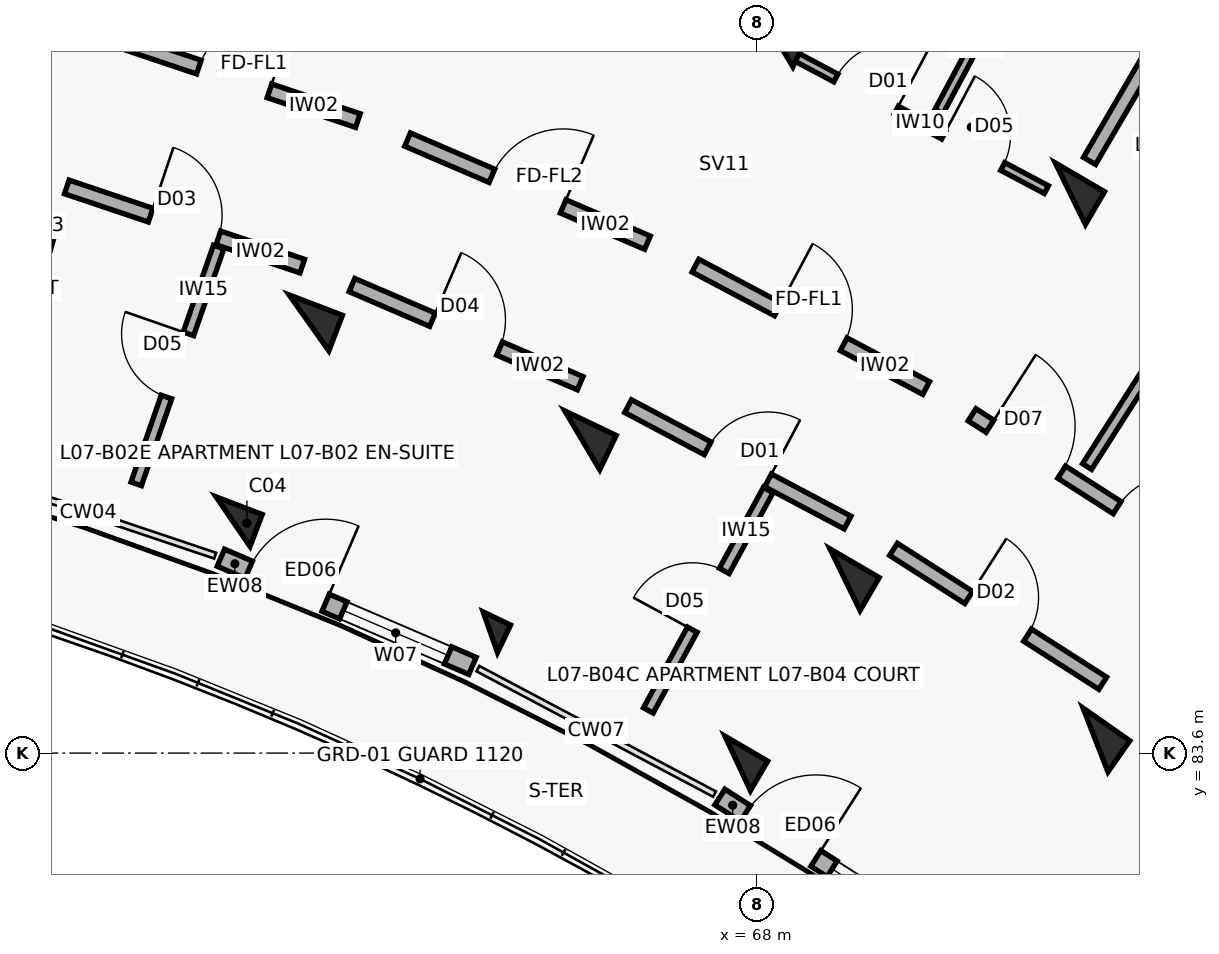
"""IFC4 building model, lengths in metres.
Left out: names, types, materials, properties, quantities, classifications, styles, units other than length and angle.
Written with IfcOpenShell. Run it as: python <this file> out.ifc"""

import sys

from ifc_helpers import new_model, si_unit, direction, frame, frame_2d, origin, origin_2d, place, context, subcontext, project, spatial, rectangle, extrude, element, fill, save


model = new_model("IFC4")
c1 = context("Model", 3, precision=1e-05, world=origin(), true_north=direction((0.0, 1.0)))
c2 = subcontext(c1, "Body", "Model", "MODEL_VIEW")
j1 = project(units=[si_unit("LENGTHUNIT", "METRE"), si_unit("PLANEANGLEUNIT", "RADIAN")], contexts=[c1])
p1 = place(None, origin())
s1 = spatial("IfcSite", under=j1, at=p1, CompositionType="ELEMENT")
p2 = place(p1, origin())
s2 = spatial("IfcBuilding", under=s1, at=p2, CompositionType="ELEMENT")
p3 = place(p2, frame((0.0, 0.0, 23.6)))
s3 = spatial("IfcBuildingStorey", under=s2, at=p3, CompositionType="ELEMENT", Elevation=23.6)
p4 = place(p3, frame((58.401, 90.508, 0.0), z_axis=(0.0, 0.0, 1.0), x_axis=(0.27966144946, 0.96009867914, 0.0)))
e1 = element("IfcColumn", 1, at=p4, inside=s3, PredefinedType="COLUMN", context=c2, shape_type="SweptSolid", body=[
    extrude(rectangle(XDim=0.5, YDim=0.75, at=origin_2d()), origin(), (0.0, 0.0, 1.0), 3.1),
])
p5 = place(p3, frame((61.111, 86.646, 0.0), z_axis=(0.0, 0.0, 1.0), x_axis=(0.357064076459, 0.934079892355, 0.0)))
e2 = element("IfcColumn", 2, at=p5, inside=s3, PredefinedType="COLUMN", context=c2, shape_type="SweptSolid", body=[
    extrude(rectangle(XDim=0.45, YDim=0.65, at=origin_2d()), origin(), (0.0, 0.0, 1.0), 3.1),
])
p6 = place(p3, frame((62.111, 89.261, 0.0), z_axis=(0.0, 0.0, 1.0), x_axis=(0.357064076459, 0.934079892355, 0.0)))
e3 = element("IfcColumn", 3, at=p6, inside=s3, PredefinedType="COLUMN", context=c2, shape_type="SweptSolid", body=[
    extrude(rectangle(XDim=0.5, YDim=0.75, at=origin_2d()), origin(), (0.0, 0.0, 1.0), 3.1),
])
p7 = place(p3, frame((64.496, 85.191, 0.0), z_axis=(0.0, 0.0, 1.0), x_axis=(0.432085748802, 0.901832526405, 0.0)))
e4 = element("IfcColumn", 4, at=p7, inside=s3, PredefinedType="COLUMN", context=c2, shape_type="SweptSolid", body=[
    extrude(rectangle(XDim=0.4, YDim=0.4, at=origin_2d()), origin(), (0.0, 0.0, 1.0), 3.1),
])
for number, where, z_axis, x_axis in (
    (5, (65.706, 87.716, 0.0), (0.0, 0.0, 1.0), (0.432, 0.902, 0.0)),
    (6, (68.246, 93.019, 0.0), (0.0, 0.0, 1.0), (0.432, 0.902, 0.0)),
):
    element("IfcColumn", number, at=place(p3, frame(where, z_axis=z_axis, x_axis=x_axis)), inside=s3, PredefinedType="COLUMN", context=c2, shape_type="SweptSolid", body=[
        extrude(rectangle(XDim=0.5, YDim=0.75, at=origin_2d()), origin(), (0.0, 0.0, 1.0), 3.1),
    ])
p8 = place(p3, frame((67.751, 83.464, 0.0), z_axis=(0.0, 0.0, 1.0), x_axis=(0.504226211181, 0.863571611366, 0.0)))
e7 = element("IfcColumn", 7, at=p8, inside=s3, PredefinedType="COLUMN", context=c2, shape_type="SweptSolid", body=[
    extrude(rectangle(XDim=0.45, YDim=0.65, at=origin_2d()), origin(), (0.0, 0.0, 1.0), 3.1),
])
for number, where, z_axis, x_axis in (
    (8, (69.163, 85.882, 0.0), (0.0, 0.0, 1.0), (0.504, 0.864, 0.0)),
    (9, (72.127, 90.96, 0.0), (0.0, 0.0, 1.0), (0.504, 0.864, 0.0)),
    (10, (72.458, 83.773, 0.0), (0.0, 0.0, 1.0), (0.573, 0.82, 0.0)),
):
    element("IfcColumn", number, at=place(p3, frame(where, z_axis=z_axis, x_axis=x_axis)), inside=s3, PredefinedType="COLUMN", context=c2, shape_type="SweptSolid", body=[
        extrude(rectangle(XDim=0.5, YDim=0.75, at=origin_2d()), origin(), (0.0, 0.0, 1.0), 3.1),
    ])
p9 = place(p3, frame((60.951, 86.171, 0.0), z_axis=(0.0, 0.0, 1.0), x_axis=(0.918713438577, -0.394924825477, 0.0)))
e11 = element("IfcWall", 11, at=p9, inside=s3, PredefinedType="SOLIDWALL", context=c2, shape_type="SweptSolid", body=[
    extrude(rectangle(XDim=3.604, YDim=0.245, at=frame_2d((1.802, 0.0))), origin(), (0.0, 0.0, 1.0), 2.25),
])
p10 = place(p9, frame((0.4, 0.0, 0.0)))
e12 = element("IfcOpeningElement", 12, at=p10, cuts=e11, PredefinedType="OPENING", context=c2, shape_type="SweptSolid", body=[
    extrude(rectangle(XDim=1.1, YDim=2.15, at=frame_2d((0.55, 1.075))), frame((0.0, 0.133, 0.0), z_axis=(0.0, -1.0, 0.0), x_axis=(1.0, 0.0, 0.0)), (0.0, 0.0, 1.0), 0.265),
])
p11 = place(p9, frame((1.754, 0.0, 0.35)))
e13 = element("IfcOpeningElement", 13, at=p11, cuts=e11, PredefinedType="OPENING", context=c2, shape_type="SweptSolid", body=[
    extrude(rectangle(XDim=1.5, YDim=1.65, at=frame_2d((0.75, 0.825))), frame((0.0, 0.133, 0.0), z_axis=(0.0, -1.0, 0.0), x_axis=(1.0, 0.0, 0.0)), (0.0, 0.0, 1.0), 0.265),
])
p12 = place(p3, frame((67.515, 83.022, 0.0), z_axis=(0.0, 0.0, 1.0), x_axis=(0.84225540507, -0.539078688718, 0.0)))
e14 = element("IfcWall", 14, at=p12, inside=s3, PredefinedType="SOLIDWALL", context=c2, shape_type="SweptSolid", body=[
    extrude(rectangle(XDim=3.604, YDim=0.245, at=frame_2d((1.802, 0.0))), origin(), (0.0, 0.0, 1.0), 2.25),
])
p13 = place(p12, frame((0.4, 0.0, 0.0)))
e15 = element("IfcOpeningElement", 15, at=p13, cuts=e14, PredefinedType="OPENING", context=c2, shape_type="SweptSolid", body=[
    extrude(rectangle(XDim=1.1, YDim=2.15, at=frame_2d((0.55, 1.075))), frame((0.0, 0.133, 0.0), z_axis=(0.0, -1.0, 0.0), x_axis=(1.0, 0.0, 0.0)), (0.0, 0.0, 1.0), 0.265),
])
p14 = place(p12, frame((1.754, 0.0, 0.35)))
e16 = element("IfcOpeningElement", 16, at=p14, cuts=e14, PredefinedType="OPENING", context=c2, shape_type="SweptSolid", body=[
    extrude(rectangle(XDim=1.5, YDim=1.65, at=frame_2d((0.75, 0.825))), frame((0.0, 0.133, 0.0), z_axis=(0.0, -1.0, 0.0), x_axis=(1.0, 0.0, 0.0)), (0.0, 0.0, 1.0), 0.265),
])
p15 = place(p3, frame((59.497, 93.018, 0.0), z_axis=(0.0, 0.0, 1.0), x_axis=(0.947863007629, -0.318678080151, 0.0)))
e17 = element("IfcWall", 17, at=p15, inside=s3, PredefinedType="SOLIDWALL", context=c2, shape_type="SweptSolid", body=[
    extrude(rectangle(XDim=3.436, YDim=0.19, at=frame_2d((1.718, 0.0))), origin(), (0.0, 0.0, 1.0), 2.08),
])
p16 = place(p15, frame((1.228, 0.0, 0.0)))
e18 = element("IfcOpeningElement", 18, at=p16, cuts=e17, PredefinedType="OPENING", context=c2, shape_type="SweptSolid", body=[
    extrude(rectangle(XDim=0.98, YDim=2.15, at=frame_2d((0.49, 1.075))), frame((0.0, 0.105, 0.0), z_axis=(0.0, -1.0, 0.0), x_axis=(1.0, 0.0, 0.0)), (0.0, 0.0, 1.0), 0.21),
])
p17 = place(p3, frame((58.923, 91.049, 0.0), z_axis=(0.0, 0.0, 1.0), x_axis=(0.94787351033, -0.318646839643, 0.0)))
e19 = element("IfcWall", 19, at=p17, inside=s3, PredefinedType="SOLIDWALL", context=c2, shape_type="SweptSolid", body=[
    extrude(rectangle(XDim=3.269, YDim=0.19, at=frame_2d((1.634, 0.0))), origin(), (0.0, 0.0, 1.0), 2.08),
])
p18 = place(p17, frame((1.164, 0.0, 0.0)))
e20 = element("IfcOpeningElement", 20, at=p18, cuts=e19, PredefinedType="OPENING", context=c2, shape_type="SweptSolid", body=[
    extrude(rectangle(XDim=0.94, YDim=2.1, at=frame_2d((0.47, 1.05))), frame((0.0, 0.105, 0.0), z_axis=(0.0, -1.0, 0.0), x_axis=(1.0, 0.0, 0.0)), (0.0, 0.0, 1.0), 0.21),
])
p19 = place(p3, frame((59.837, 87.143, 0.0), z_axis=(0.0, 0.0, 1.0), x_axis=(0.328629662527, 0.944458863534, 0.0)))
e21 = element("IfcWall", 21, at=p19, inside=s3, PredefinedType="PARTITIONING", context=c2, shape_type="SweptSolid", body=[
    extrude(rectangle(XDim=3.3, YDim=0.145, at=frame_2d((1.65, 0.0))), origin(), (0.0, 0.0, 1.0), 2.08),
])
p20 = place(p19, frame((1.21, 0.0, 0.0)))
e22 = element("IfcOpeningElement", 22, at=p20, cuts=e21, PredefinedType="OPENING", context=c2, shape_type="SweptSolid", body=[
    extrude(rectangle(XDim=0.88, YDim=2.1, at=frame_2d((0.44, 1.05))), frame((0.0, 0.083, 0.0), z_axis=(0.0, -1.0, 0.0), x_axis=(1.0, 0.0, 0.0)), (0.0, 0.0, 1.0), 0.165),
])
p21 = place(p3, frame((63.407, 91.673, 0.0), z_axis=(0.0, 0.0, 1.0), x_axis=(0.918718172399, -0.394913813008, 0.0)))
e23 = element("IfcWall", 23, at=p21, inside=s3, PredefinedType="SOLIDWALL", context=c2, shape_type="SweptSolid", body=[
    extrude(rectangle(XDim=3.436, YDim=0.19, at=frame_2d((1.718, 0.0))), origin(), (0.0, 0.0, 1.0), 2.08),
])
p22 = place(p21, frame((1.208, 0.0, 0.0)))
e24 = element("IfcOpeningElement", 24, at=p22, cuts=e23, PredefinedType="OPENING", context=c2, shape_type="SweptSolid", body=[
    extrude(rectangle(XDim=1.02, YDim=2.15, at=frame_2d((0.51, 1.075))), frame((0.0, 0.105, 0.0), z_axis=(0.0, -1.0, 0.0), x_axis=(1.0, 0.0, 0.0)), (0.0, 0.0, 1.0), 0.21),
])
p23 = place(p3, frame((62.675, 89.758, 0.0), z_axis=(0.0, 0.0, 1.0), x_axis=(0.918723391052, -0.394901672235, 0.0)))
e25 = element("IfcWall", 25, at=p23, inside=s3, PredefinedType="SOLIDWALL", context=c2, shape_type="SweptSolid", body=[
    extrude(rectangle(XDim=3.269, YDim=0.19, at=frame_2d((1.634, 0.0))), origin(), (0.0, 0.0, 1.0), 2.08),
])
p24 = place(p23, frame((1.154, 0.0, 0.0)))
e26 = element("IfcOpeningElement", 26, at=p24, cuts=e25, PredefinedType="OPENING", context=c2, shape_type="SweptSolid", body=[
    extrude(rectangle(XDim=0.96, YDim=2.1, at=frame_2d((0.48, 1.05))), frame((0.0, 0.105, 0.0), z_axis=(0.0, -1.0, 0.0), x_axis=(1.0, 0.0, 0.0)), (0.0, 0.0, 1.0), 0.21),
])
p25 = place(p3, frame((67.194, 90.014, 0.0), z_axis=(0.0, 0.0, 1.0), x_axis=(0.883410853063, -0.468599258099, 0.0)))
e27 = element("IfcWall", 27, at=p25, inside=s3, PredefinedType="SOLIDWALL", context=c2, shape_type="SweptSolid", body=[
    extrude(rectangle(XDim=3.436, YDim=0.19, at=frame_2d((1.718, 0.0))), origin(), (0.0, 0.0, 1.0), 2.08),
])
p26 = place(p25, frame((1.228, 0.0, 0.0)))
e28 = element("IfcOpeningElement", 28, at=p26, cuts=e27, PredefinedType="OPENING", context=c2, shape_type="SweptSolid", body=[
    extrude(rectangle(XDim=0.98, YDim=2.15, at=frame_2d((0.49, 1.075))), frame((0.0, 0.105, 0.0), z_axis=(0.0, -1.0, 0.0), x_axis=(1.0, 0.0, 0.0)), (0.0, 0.0, 1.0), 0.21),
])
p27 = place(p3, frame((66.309, 88.165, 0.0), z_axis=(0.0, 0.0, 1.0), x_axis=(0.883444301944, -0.468536194293, 0.0)))
e29 = element("IfcWall", 29, at=p27, inside=s3, PredefinedType="SOLIDWALL", context=c2, shape_type="SweptSolid", body=[
    extrude(rectangle(XDim=3.269, YDim=0.19, at=frame_2d((1.634, 0.0))), origin(), (0.0, 0.0, 1.0), 2.08),
])
p28 = place(p27, frame((1.184, 0.0, 0.0)))
e30 = element("IfcOpeningElement", 30, at=p28, cuts=e29, PredefinedType="OPENING", context=c2, shape_type="SweptSolid", body=[
    extrude(rectangle(XDim=0.9, YDim=2.1, at=frame_2d((0.45, 1.05))), frame((0.0, 0.105, 0.0), z_axis=(0.0, -1.0, 0.0), x_axis=(1.0, 0.0, 0.0)), (0.0, 0.0, 1.0), 0.21),
])
p29 = place(p3, frame((66.575, 84.162, 0.0), z_axis=(0.0, 0.0, 1.0), x_axis=(0.477841058477, 0.878446311868, 0.0)))
e31 = element("IfcWall", 31, at=p29, inside=s3, PredefinedType="PARTITIONING", context=c2, shape_type="SweptSolid", body=[
    extrude(rectangle(XDim=3.3, YDim=0.145, at=frame_2d((1.65, 0.0))), origin(), (0.0, 0.0, 1.0), 2.08),
])
p30 = place(p29, frame((1.21, 0.0, 0.0)))
e32 = element("IfcOpeningElement", 32, at=p30, cuts=e31, PredefinedType="OPENING", context=c2, shape_type="SweptSolid", body=[
    extrude(rectangle(XDim=0.88, YDim=2.1, at=frame_2d((0.44, 1.05))), frame((0.0, 0.083, 0.0), z_axis=(0.0, -1.0, 0.0), x_axis=(1.0, 0.0, 0.0)), (0.0, 0.0, 1.0), 0.165),
])
p31 = place(p3, frame((68.468, 92.788, 0.0), z_axis=(0.0, 0.0, 1.0), x_axis=(0.883450371448, -0.468524749814, 0.0)))
e33 = element("IfcWall", 33, at=p31, inside=s3, PredefinedType="PARTITIONING", context=c2, shape_type="SweptSolid", body=[
    extrude(rectangle(XDim=3.785, YDim=0.115, at=frame_2d((1.893, 0.0))), origin(), (0.0, 0.0, 1.0), 2.08),
])
p32 = place(p31, frame((0.65, 0.0, 0.0)))
e34 = element("IfcOpeningElement", 34, at=p32, cuts=e33, PredefinedType="OPENING", context=c2, shape_type="SweptSolid", body=[
    extrude(rectangle(XDim=0.9, YDim=2.1, at=frame_2d((0.45, 1.05))), frame((0.0, 0.067, 0.0), z_axis=(0.0, -1.0, 0.0), x_axis=(1.0, 0.0, 0.0)), (0.0, 0.0, 1.0), 0.135),
])
p33 = place(p31, frame((2.255, 0.0, 0.0)))
e35 = element("IfcOpeningElement", 35, at=p33, cuts=e33, PredefinedType="OPENING", context=c2, shape_type="SweptSolid", body=[
    extrude(rectangle(XDim=0.88, YDim=2.1, at=frame_2d((0.44, 1.05))), frame((0.0, 0.067, 0.0), z_axis=(0.0, -1.0, 0.0), x_axis=(1.0, 0.0, 0.0)), (0.0, 0.0, 1.0), 0.135),
])
p34 = place(p3, frame((70.398, 92.041, 0.0), z_axis=(0.0, 0.0, 1.0), x_axis=(0.471222960991, 0.882014127457, 0.0)))
e36 = element("IfcWall", 36, at=p34, inside=s3, PredefinedType="PARTITIONING", context=c2, shape_type="SweptSolid", body=[
    extrude(rectangle(XDim=5.05, YDim=0.12, at=frame_2d((2.525, 0.0))), origin(), (0.0, 0.0, 1.0), 2.08),
])
p35 = place(p34, frame((1.995, 0.0, 0.0)))
e37 = element("IfcOpeningElement", 37, at=p35, cuts=e36, PredefinedType="OPENING", context=c2, shape_type="SweptSolid", body=[
    extrude(rectangle(XDim=1.06, YDim=2.1, at=frame_2d((0.53, 1.05))), frame((0.0, 0.07, 0.0), z_axis=(0.0, -1.0, 0.0), x_axis=(1.0, 0.0, 0.0)), (0.0, 0.0, 1.0), 0.14),
])
p36 = place(p3, frame((70.834, 88.051, 0.0), z_axis=(0.0, 0.0, 1.0), x_axis=(0.842257205985, -0.539075874963, 0.0)))
e38 = element("IfcWall", 38, at=p36, inside=s3, PredefinedType="SOLIDWALL", context=c2, shape_type="SweptSolid", body=[
    extrude(rectangle(XDim=3.436, YDim=0.19, at=frame_2d((1.718, 0.0))), origin(), (0.0, 0.0, 1.0), 2.08),
])
p37 = place(p36, frame((0.28, 0.0, 0.0)))
e39 = element("IfcOpeningElement", 39, at=p37, cuts=e38, PredefinedType="OPENING", context=c2, shape_type="SweptSolid", body=[
    extrude(rectangle(XDim=1.12, YDim=2.15, at=frame_2d((0.56, 1.075))), frame((0.0, 0.105, 0.0), z_axis=(0.0, -1.0, 0.0), x_axis=(1.0, 0.0, 0.0)), (0.0, 0.0, 1.0), 0.21),
])
p38 = place(p36, frame((2.266, 0.0, 0.0)))
e40 = element("IfcOpeningElement", 40, at=p38, cuts=e38, PredefinedType="OPENING", context=c2, shape_type="SweptSolid", body=[
    extrude(rectangle(XDim=0.95, YDim=2.1, at=frame_2d((0.475, 1.05))), frame((0.0, 0.105, 0.0), z_axis=(0.0, -1.0, 0.0), x_axis=(1.0, 0.0, 0.0)), (0.0, 0.0, 1.0), 0.21),
])
p39 = place(p3, frame((69.8, 86.281, 0.0), z_axis=(0.0, 0.0, 1.0), x_axis=(0.842225276846, -0.539125758095, 0.0)))
e41 = element("IfcWall", 41, at=p39, inside=s3, PredefinedType="SOLIDWALL", context=c2, shape_type="SweptSolid", body=[
    extrude(rectangle(XDim=3.269, YDim=0.19, at=frame_2d((1.634, 0.0))), origin(), (0.0, 0.0, 1.0), 2.08),
])
p40 = place(p39, frame((1.174, 0.0, 0.0)))
e42 = element("IfcOpeningElement", 42, at=p40, cuts=e41, PredefinedType="OPENING", context=c2, shape_type="SweptSolid", body=[
    extrude(rectangle(XDim=0.92, YDim=2.1, at=frame_2d((0.46, 1.05))), frame((0.0, 0.105, 0.0), z_axis=(0.0, -1.0, 0.0), x_axis=(1.0, 0.0, 0.0)), (0.0, 0.0, 1.0), 0.21),
])
p41 = place(p3, frame((72.347, 87.37, 0.0), z_axis=(0.0, 0.0, 1.0), x_axis=(0.537777309481, 0.843086926365, 0.0)))
e43 = element("IfcWall", 43, at=p41, inside=s3, PredefinedType="PARTITIONING", context=c2, shape_type="SweptSolid", body=[
    extrude(rectangle(XDim=7.95, YDim=0.14, at=frame_2d((3.975, 0.0))), origin(), (0.0, 0.0, 1.0), 2.08),
])
p42 = place(p41, frame((6.05, 0.0, 0.0)))
e44 = element("IfcOpeningElement", 44, at=p42, cuts=e43, PredefinedType="OPENING", context=c2, shape_type="SweptSolid", body=[
    extrude(rectangle(XDim=0.92, YDim=2.1, at=frame_2d((0.46, 1.05))), frame((0.0, 0.08, 0.0), z_axis=(0.0, -1.0, 0.0), x_axis=(1.0, 0.0, 0.0)), (0.0, 0.0, 1.0), 0.16),
])
p43 = place(p3, frame((72.379, 91.392, 0.0), z_axis=(0.0, 0.0, 1.0), x_axis=(0.504216452091, 0.863577309475, 0.0)))
e45 = element("IfcWall", 45, at=p43, inside=s3, PredefinedType="SOLIDWALL", context=c2, shape_type="SweptSolid", body=[
    extrude(rectangle(XDim=4.35, YDim=0.185, at=frame_2d((2.175, 0.0))), origin(), (0.0, 0.0, 1.0), 2.08),
])
p44 = place(p10, origin())
e46 = element("IfcDoor", 46, at=p44, inside=s3, OperationType="SINGLE_SWING_RIGHT", PredefinedType="DOOR", context=c2, shape_type="SweptSolid", body=[
    extrude(rectangle(XDim=1.1, YDim=2.15, at=frame_2d((0.55, 1.075))), frame((0.0, 0.025, 0.0), z_axis=(0.0, -1.0, 0.0), x_axis=(1.0, 0.0, 0.0)), (0.0, 0.0, 1.0), 0.05),
])
fill(e12, e46)
p45 = place(p11, origin())
e47 = element("IfcWindow", 47, at=p45, inside=s3, PartitioningType="DOUBLE_PANEL_VERTICAL", PredefinedType="WINDOW", context=c2, shape_type="SweptSolid", body=[
    extrude(rectangle(XDim=1.5, YDim=1.65, at=frame_2d((0.75, 0.825))), frame((0.0, 0.03, 0.0), z_axis=(0.0, -1.0, 0.0), x_axis=(1.0, 0.0, 0.0)), (0.0, 0.0, 1.0), 0.06),
])
fill(e13, e47)
p46 = place(p13, origin())
e48 = element("IfcDoor", 48, at=p46, inside=s3, OperationType="SINGLE_SWING_RIGHT", PredefinedType="DOOR", context=c2, shape_type="SweptSolid", body=[
    extrude(rectangle(XDim=1.1, YDim=2.15, at=frame_2d((0.55, 1.075))), frame((0.0, 0.025, 0.0), z_axis=(0.0, -1.0, 0.0), x_axis=(1.0, 0.0, 0.0)), (0.0, 0.0, 1.0), 0.05),
])
fill(e15, e48)
p47 = place(p14, origin())
e49 = element("IfcWindow", 49, at=p47, inside=s3, PartitioningType="DOUBLE_PANEL_VERTICAL", PredefinedType="WINDOW", context=c2, shape_type="SweptSolid", body=[
    extrude(rectangle(XDim=1.5, YDim=1.65, at=frame_2d((0.75, 0.825))), frame((0.0, 0.03, 0.0), z_axis=(0.0, -1.0, 0.0), x_axis=(1.0, 0.0, 0.0)), (0.0, 0.0, 1.0), 0.06),
])
fill(e16, e49)
p48 = place(p16, origin())
e50 = element("IfcDoor", 50, at=p48, inside=s3, OperationType="SINGLE_SWING_RIGHT", PredefinedType="DOOR", context=c2, shape_type="SweptSolid", body=[
    extrude(rectangle(XDim=0.98, YDim=2.15, at=frame_2d((0.49, 1.075))), frame((0.0, 0.025, 0.0), z_axis=(0.0, -1.0, 0.0), x_axis=(1.0, 0.0, 0.0)), (0.0, 0.0, 1.0), 0.05),
])
fill(e18, e50)
p49 = place(p18, origin())
e51 = element("IfcDoor", 51, at=p49, inside=s3, OperationType="SINGLE_SWING_LEFT", PredefinedType="DOOR", context=c2, shape_type="SweptSolid", body=[
    extrude(rectangle(XDim=0.94, YDim=2.1, at=frame_2d((0.47, 1.05))), frame((0.0, 0.025, 0.0), z_axis=(0.0, -1.0, 0.0), x_axis=(1.0, 0.0, 0.0)), (0.0, 0.0, 1.0), 0.05),
])
fill(e20, e51)
p50 = place(p20, origin())
e52 = element("IfcDoor", 52, at=p50, inside=s3, OperationType="SINGLE_SWING_RIGHT", PredefinedType="DOOR", context=c2, shape_type="SweptSolid", body=[
    extrude(rectangle(XDim=0.88, YDim=2.1, at=frame_2d((0.44, 1.05))), frame((0.0, 0.025, 0.0), z_axis=(0.0, -1.0, 0.0), x_axis=(1.0, 0.0, 0.0)), (0.0, 0.0, 1.0), 0.05),
])
fill(e22, e52)
p51 = place(p22, origin())
e53 = element("IfcDoor", 53, at=p51, inside=s3, OperationType="SINGLE_SWING_RIGHT", PredefinedType="DOOR", context=c2, shape_type="SweptSolid", body=[
    extrude(rectangle(XDim=1.02, YDim=2.15, at=frame_2d((0.51, 1.075))), frame((0.0, 0.025, 0.0), z_axis=(0.0, -1.0, 0.0), x_axis=(1.0, 0.0, 0.0)), (0.0, 0.0, 1.0), 0.05),
])
fill(e24, e53)
p52 = place(p24, origin())
e54 = element("IfcDoor", 54, at=p52, inside=s3, OperationType="SINGLE_SWING_LEFT", PredefinedType="DOOR", context=c2, shape_type="SweptSolid", body=[
    extrude(rectangle(XDim=0.96, YDim=2.1, at=frame_2d((0.48, 1.05))), frame((0.0, 0.025, 0.0), z_axis=(0.0, -1.0, 0.0), x_axis=(1.0, 0.0, 0.0)), (0.0, 0.0, 1.0), 0.05),
])
fill(e26, e54)
p53 = place(p26, origin())
e55 = element("IfcDoor", 55, at=p53, inside=s3, OperationType="SINGLE_SWING_LEFT", PredefinedType="DOOR", context=c2, shape_type="SweptSolid", body=[
    extrude(rectangle(XDim=0.98, YDim=2.15, at=frame_2d((0.49, 1.075))), frame((0.0, 0.025, 0.0), z_axis=(0.0, -1.0, 0.0), x_axis=(1.0, 0.0, 0.0)), (0.0, 0.0, 1.0), 0.05),
])
fill(e28, e55)
p54 = place(p28, origin())
e56 = element("IfcDoor", 56, at=p54, inside=s3, OperationType="SINGLE_SWING_RIGHT", PredefinedType="DOOR", context=c2, shape_type="SweptSolid", body=[
    extrude(rectangle(XDim=0.9, YDim=2.1, at=frame_2d((0.45, 1.05))), frame((0.0, 0.025, 0.0), z_axis=(0.0, -1.0, 0.0), x_axis=(1.0, 0.0, 0.0)), (0.0, 0.0, 1.0), 0.05),
])
fill(e30, e56)
p55 = place(p30, origin())
e57 = element("IfcDoor", 57, at=p55, inside=s3, OperationType="SINGLE_SWING_LEFT", PredefinedType="DOOR", context=c2, shape_type="SweptSolid", body=[
    extrude(rectangle(XDim=0.88, YDim=2.1, at=frame_2d((0.44, 1.05))), frame((0.0, 0.025, 0.0), z_axis=(0.0, -1.0, 0.0), x_axis=(1.0, 0.0, 0.0)), (0.0, 0.0, 1.0), 0.05),
])
fill(e32, e57)
p56 = place(p32, origin())
e58 = element("IfcDoor", 58, at=p56, inside=s3, OperationType="SINGLE_SWING_RIGHT", PredefinedType="DOOR", context=c2, shape_type="SweptSolid", body=[
    extrude(rectangle(XDim=0.9, YDim=2.1, at=frame_2d((0.45, 1.05))), frame((0.0, 0.025, 0.0), z_axis=(0.0, -1.0, 0.0), x_axis=(1.0, 0.0, 0.0)), (0.0, 0.0, 1.0), 0.05),
])
fill(e34, e58)
p57 = place(p33, origin())
e59 = element("IfcDoor", 59, at=p57, inside=s3, OperationType="SINGLE_SWING_LEFT", PredefinedType="DOOR", context=c2, shape_type="SweptSolid", body=[
    extrude(rectangle(XDim=0.88, YDim=2.1, at=frame_2d((0.44, 1.05))), frame((0.0, 0.025, 0.0), z_axis=(0.0, -1.0, 0.0), x_axis=(1.0, 0.0, 0.0)), (0.0, 0.0, 1.0), 0.05),
])
fill(e35, e59)
p58 = place(p37, origin())
e60 = element("IfcDoor", 60, at=p58, inside=s3, OperationType="SINGLE_SWING_LEFT", PredefinedType="DOOR", context=c2, shape_type="SweptSolid", body=[
    extrude(rectangle(XDim=1.12, YDim=2.15, at=frame_2d((0.56, 1.075))), frame((0.0, 0.025, 0.0), z_axis=(0.0, -1.0, 0.0), x_axis=(1.0, 0.0, 0.0)), (0.0, 0.0, 1.0), 0.05),
])
fill(e39, e60)
p59 = place(p38, origin())
e61 = element("IfcDoor", 61, at=p59, inside=s3, OperationType="SINGLE_SWING_RIGHT", PredefinedType="DOOR", context=c2, shape_type="SweptSolid", body=[
    extrude(rectangle(XDim=0.95, YDim=2.1, at=frame_2d((0.475, 1.05))), frame((0.0, 0.025, 0.0), z_axis=(0.0, -1.0, 0.0), x_axis=(1.0, 0.0, 0.0)), (0.0, 0.0, 1.0), 0.05),
])
fill(e40, e61)
p60 = place(p40, origin())
e62 = element("IfcDoor", 62, at=p60, inside=s3, OperationType="SINGLE_SWING_LEFT", PredefinedType="DOOR", context=c2, shape_type="SweptSolid", body=[
    extrude(rectangle(XDim=0.92, YDim=2.1, at=frame_2d((0.46, 1.05))), frame((0.0, 0.025, 0.0), z_axis=(0.0, -1.0, 0.0), x_axis=(1.0, 0.0, 0.0)), (0.0, 0.0, 1.0), 0.05),
])
fill(e42, e62)
save(model, sys.argv[1])
